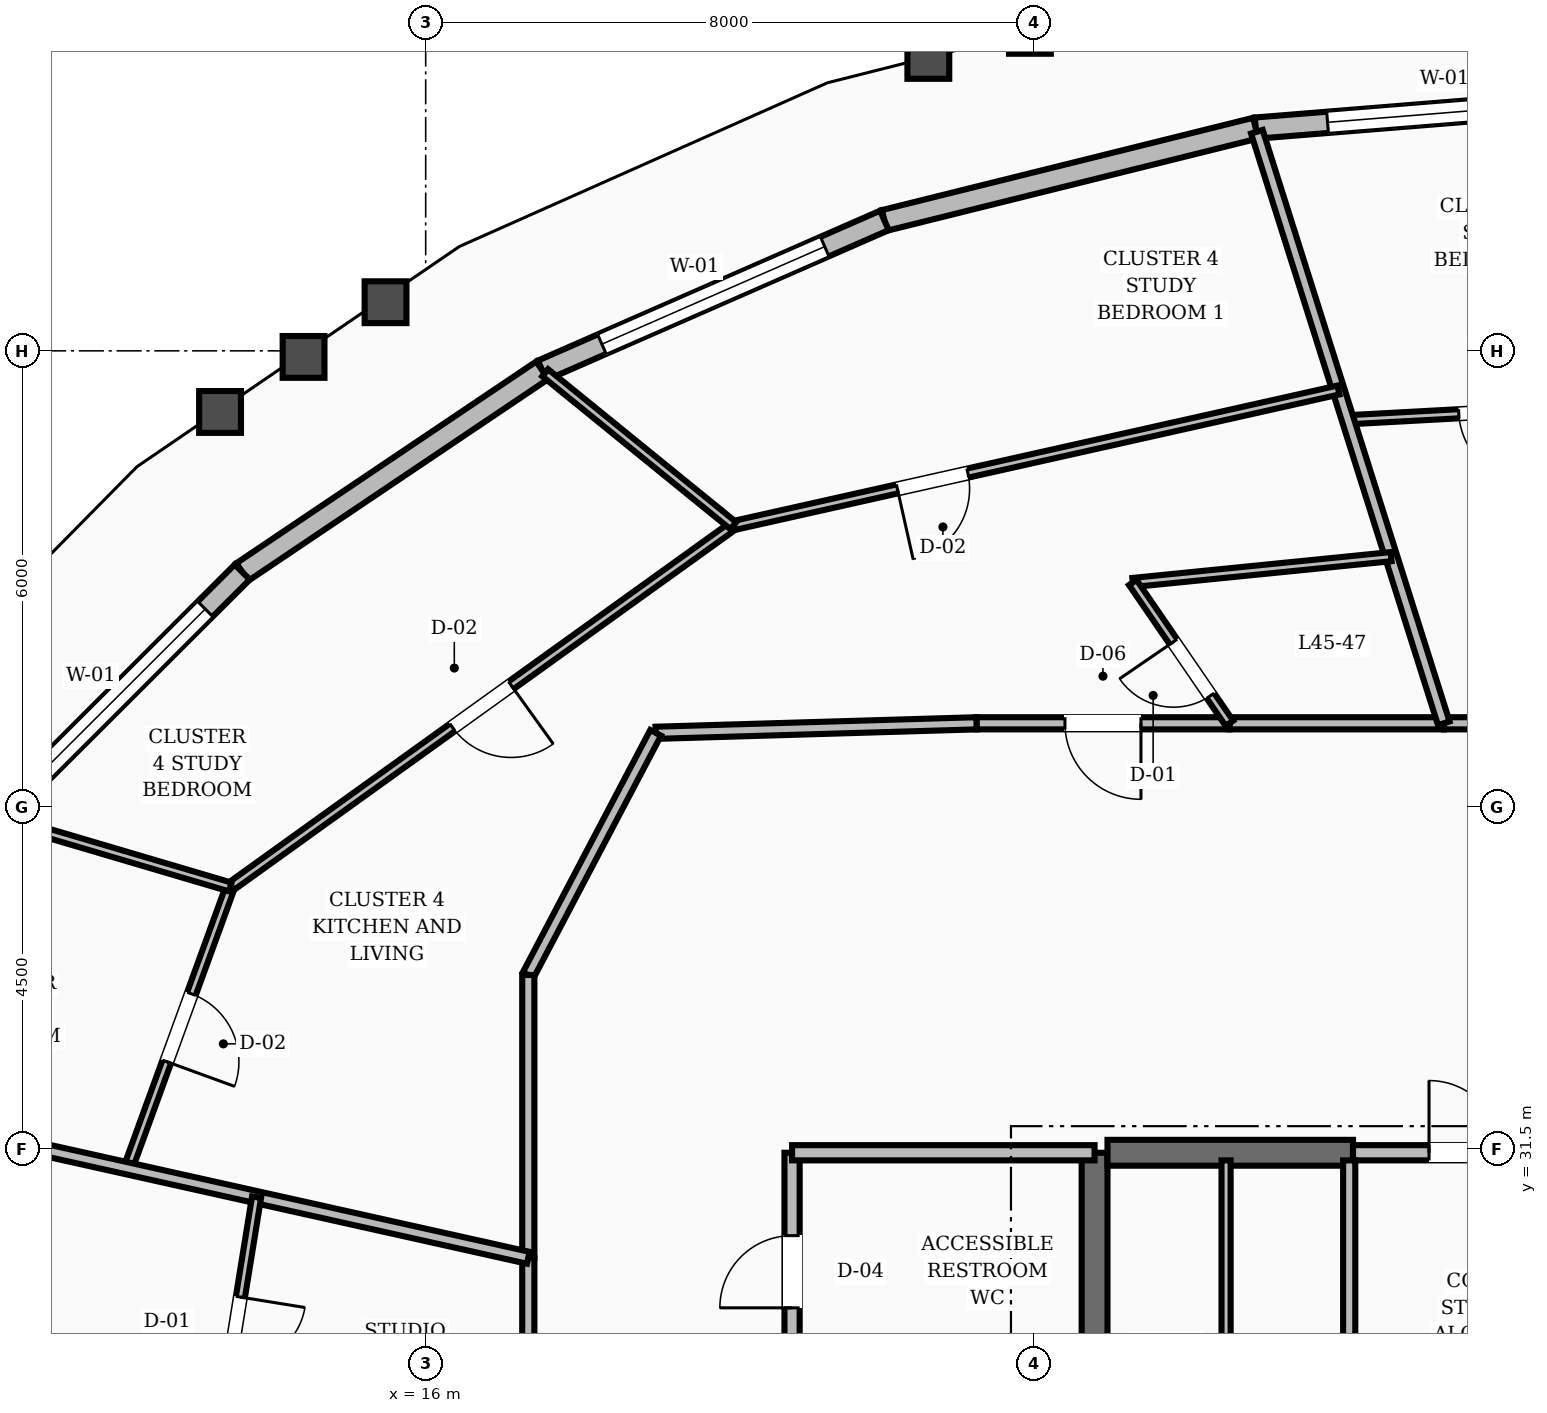
"""IFC4 building model, lengths in metres.
Left out: names, types, materials, properties, quantities, classifications, styles, units other than length and angle.
Written with IfcOpenShell. Run it as: python <this file> out.ifc"""

import sys

from ifc_helpers import new_model, si_unit, direction, frame, frame_2d, origin, place, context, subcontext, project, spatial, rectangle, extrude, element, fill, save


model = new_model("IFC4")
c1 = context("Model", 3, precision=1e-05, world=origin(), true_north=direction((0.0, 1.0)))
c2 = subcontext(c1, "Body", "Model", "MODEL_VIEW")
j1 = project(units=[si_unit("LENGTHUNIT", "METRE"), si_unit("PLANEANGLEUNIT", "RADIAN")], contexts=[c1])
p1 = place(None, origin())
s1 = spatial("IfcSite", under=j1, at=p1, CompositionType="ELEMENT")
p2 = place(p1, origin())
s2 = spatial("IfcBuilding", under=s1, at=p2, CompositionType="ELEMENT")
p3 = place(p2, frame((0.0, 0.0, 174.8)))
s3 = spatial("IfcBuildingStorey", under=s2, at=p3, CompositionType="ELEMENT", Elevation=174.8)
p4 = place(p3, frame((24.8, 25.15, 0.0), z_axis=(0.0, 0.0, 1.0), x_axis=(0.0, 1.0, 0.0)))
e1 = element("IfcWall", 1, at=p4, inside=s3, PredefinedType="SHEAR", context=c2, shape_type="SweptSolid", body=[
    extrude(rectangle(XDim=6.3, YDim=0.34, at=frame_2d((3.15, 0.0))), origin(), (0.0, 0.0, 1.0), 3.6),
])
p5 = place(p3, frame((24.97, 31.45, 0.0), z_axis=(0.0, 0.0, 1.0), x_axis=(1.0, 0.0, 0.0)))
e2 = element("IfcWall", 2, at=p5, inside=s3, PredefinedType="SHEAR", context=c2, shape_type="SweptSolid", body=[
    extrude(rectangle(XDim=3.23, YDim=0.34, at=frame_2d((1.615, 0.0))), origin(), (0.0, 0.0, 1.0), 3.6),
])
p6 = place(p3, frame((32.0, 45.34, 0.0), z_axis=(0.0, 0.0, 1.0), x_axis=(-0.996756522082, -0.080476305128, 0.0)))
e3 = element("IfcWall", 3, at=p6, inside=s3, PredefinedType="STANDARD", context=c2, shape_type="SweptSolid", body=[
    extrude(rectangle(XDim=5.097, YDim=0.28, at=frame_2d((2.548, 0.0))), origin(), (0.0, 0.0, 1.0), 2.82),
])
p7 = place(p6, frame((0.948, 0.0, 0.8)))
e4 = element("IfcOpeningElement", 4, at=p7, cuts=e3, PredefinedType="OPENING", context=c2, shape_type="SweptSolid", body=[
    extrude(rectangle(XDim=3.2, YDim=1.65, at=frame_2d((1.6, 0.825))), frame((0.0, 0.15, 0.0), z_axis=(0.0, -1.0, 0.0), x_axis=(1.0, 0.0, 0.0)), (0.0, 0.0, 1.0), 0.3),
])
p8 = place(p3, frame((26.92, 44.93, 0.0), z_axis=(0.0, 0.0, 1.0), x_axis=(-0.970464034564, -0.241245844766, 0.0)))
e5 = element("IfcWall", 5, at=p8, inside=s3, PredefinedType="STANDARD", context=c2, shape_type="SweptSolid", body=[
    extrude(rectangle(XDim=5.034, YDim=0.28, at=frame_2d((2.517, 0.0))), origin(), (0.0, 0.0, 1.0), 2.82),
])
p9 = place(p3, frame((22.035, 43.716, 0.0), z_axis=(0.0, 0.0, 1.0), x_axis=(-0.915983961181, -0.401214883647, 0.0)))
e6 = element("IfcWall", 6, at=p9, inside=s3, PredefinedType="STANDARD", context=c2, shape_type="SweptSolid", body=[
    extrude(rectangle(XDim=4.915, YDim=0.28, at=frame_2d((2.458, 0.0))), origin(), (0.0, 0.0, 1.0), 2.82),
])
p10 = place(p9, frame((0.857, 0.0, 0.8)))
e7 = element("IfcOpeningElement", 7, at=p10, cuts=e6, PredefinedType="OPENING", context=c2, shape_type="SweptSolid", body=[
    extrude(rectangle(XDim=3.2, YDim=1.65, at=frame_2d((1.6, 0.825))), frame((0.0, 0.15, 0.0), z_axis=(0.0, -1.0, 0.0), x_axis=(1.0, 0.0, 0.0)), (0.0, 0.0, 1.0), 0.3),
])
p11 = place(p3, frame((17.533, 41.744, 0.0), z_axis=(0.0, 0.0, 1.0), x_axis=(-0.829776575502, -0.558095721851, 0.0)))
e8 = element("IfcWall", 8, at=p11, inside=s3, PredefinedType="STANDARD", context=c2, shape_type="SweptSolid", body=[
    extrude(rectangle(XDim=4.756, YDim=0.28, at=frame_2d((2.378, 0.0))), origin(), (0.0, 0.0, 1.0), 2.82),
])
p12 = place(p3, frame((13.587, 39.09, 0.0), z_axis=(0.0, 0.0, 1.0), x_axis=(-0.707640043992, -0.706573115919, 0.0)))
e9 = element("IfcWall", 9, at=p12, inside=s3, PredefinedType="STANDARD", context=c2, shape_type="SweptSolid", body=[
    extrude(rectangle(XDim=4.576, YDim=0.28, at=frame_2d((2.288, 0.0))), origin(), (0.0, 0.0, 1.0), 2.82),
])
p13 = place(p12, frame((0.688, 0.0, 0.8)))
e10 = element("IfcOpeningElement", 10, at=p13, cuts=e9, PredefinedType="OPENING", context=c2, shape_type="SweptSolid", body=[
    extrude(rectangle(XDim=3.2, YDim=1.65, at=frame_2d((1.6, 0.825))), frame((0.0, 0.15, 0.0), z_axis=(0.0, -1.0, 0.0), x_axis=(1.0, 0.0, 0.0)), (0.0, 0.0, 1.0), 0.3),
])
p14 = place(p3, frame((20.82, 28.32, 0.0), z_axis=(0.0, 0.0, 1.0), x_axis=(0.0, 1.0, 0.0)))
e11 = element("IfcWall", 11, at=p14, inside=s3, PredefinedType="SOLIDWALL", context=c2, shape_type="SweptSolid", body=[
    extrude(rectangle(XDim=3.13, YDim=0.2, at=frame_2d((1.565, 0.0))), origin(), (0.0, 0.0, 1.0), 2.8),
])
p15 = place(p14, frame((1.09, 0.0, 0.0)))
e12 = element("IfcOpeningElement", 12, at=p15, cuts=e11, PredefinedType="OPENING", context=c2, shape_type="SweptSolid", body=[
    extrude(rectangle(XDim=0.95, YDim=2.1, at=frame_2d((0.475, 1.05))), frame((0.0, 0.11, 0.0), z_axis=(0.0, -1.0, 0.0), x_axis=(1.0, 0.0, 0.0)), (0.0, 0.0, 1.0), 0.22),
])
p16 = place(p3, frame((20.82, 31.45, 0.0), z_axis=(0.0, 0.0, 1.0), x_axis=(1.0, 0.0, 0.0)))
e13 = element("IfcWall", 13, at=p16, inside=s3, PredefinedType="SOLIDWALL", context=c2, shape_type="SweptSolid", body=[
    extrude(rectangle(XDim=3.98, YDim=0.2, at=frame_2d((1.99, 0.0))), origin(), (0.0, 0.0, 1.0), 2.8),
])
p17 = place(p3, frame((28.2, 31.45, 0.0), z_axis=(0.0, 0.0, 1.0), x_axis=(1.0, 0.0, 0.0)))
e14 = element("IfcWall", 14, at=p17, inside=s3, PredefinedType="SOLIDWALL", context=c2, shape_type="SweptSolid", body=[
    extrude(rectangle(XDim=7.6, YDim=0.2, at=frame_2d((3.8, 0.0))), origin(), (0.0, 0.0, 1.0), 2.8),
])
p18 = place(p17, frame((1.0, 0.0, 0.0)))
e15 = element("IfcOpeningElement", 15, at=p18, cuts=e14, PredefinedType="OPENING", context=c2, shape_type="SweptSolid", body=[
    extrude(rectangle(XDim=0.95, YDim=2.1, at=frame_2d((0.475, 1.05))), frame((0.0, 0.11, 0.0), z_axis=(0.0, -1.0, 0.0), x_axis=(1.0, 0.0, 0.0)), (0.0, 0.0, 1.0), 0.22),
])
p19 = place(p3, frame((28.15, 25.25, 0.0), z_axis=(0.0, 0.0, 1.0), x_axis=(0.0, 1.0, 0.0)))
e16 = element("IfcWall", 16, at=p19, inside=s3, PredefinedType="SOLIDWALL", context=c2, shape_type="SweptSolid", body=[
    extrude(rectangle(XDim=6.1, YDim=0.16, at=frame_2d((3.05, 0.0))), origin(), (0.0, 0.0, 1.0), 2.8),
])
p20 = place(p3, frame((26.53, 25.25, 0.0), z_axis=(0.0, 0.0, 1.0), x_axis=(0.0, 1.0, 0.0)))
e17 = element("IfcWall", 17, at=p20, inside=s3, PredefinedType="PARTITIONING", context=c2, shape_type="SweptSolid", body=[
    extrude(rectangle(XDim=6.1, YDim=0.12, at=frame_2d((3.05, 0.0))), origin(), (0.0, 0.0, 1.0), 2.8),
])
p21 = place(p3, frame((32.0, 37.1, 0.0), z_axis=(0.0, 0.0, 1.0), x_axis=(-1.0, 0.0, 0.0)))
e18 = element("IfcWall", 18, at=p21, inside=s3, PredefinedType="SOLIDWALL", context=c2, shape_type="SweptSolid", body=[
    extrude(rectangle(XDim=2.606, YDim=0.16, at=frame_2d((1.303, 0.0))), origin(), (0.0, 0.0, 1.0), 2.8),
])
p22 = place(p3, frame((29.394, 37.1, 0.0), z_axis=(0.0, 0.0, 1.0), x_axis=(-1.0, 0.0, 0.0)))
e19 = element("IfcWall", 19, at=p22, inside=s3, PredefinedType="SOLIDWALL", context=c2, shape_type="SweptSolid", body=[
    extrude(rectangle(XDim=2.821, YDim=0.16, at=frame_2d((1.41, 0.0))), origin(), (0.0, 0.0, 1.0), 2.8),
])
p23 = place(p3, frame((26.574, 37.1, 0.0), z_axis=(0.0, 0.0, 1.0), x_axis=(-1.0, 0.0, 0.0)))
e20 = element("IfcWall", 20, at=p23, inside=s3, PredefinedType="SOLIDWALL", context=c2, shape_type="SweptSolid", body=[
    extrude(rectangle(XDim=3.327, YDim=0.16, at=frame_2d((1.664, 0.0))), origin(), (0.0, 0.0, 1.0), 2.8),
])
p24 = place(p23, frame((1.164, 0.0, 0.0)))
e21 = element("IfcOpeningElement", 21, at=p24, cuts=e20, PredefinedType="OPENING", context=c2, shape_type="SweptSolid", body=[
    extrude(rectangle(XDim=1.0, YDim=2.1, at=frame_2d((0.5, 1.05))), frame((0.0, 0.09, 0.0), z_axis=(0.0, -1.0, 0.0), x_axis=(1.0, 0.0, 0.0)), (0.0, 0.0, 1.0), 0.18),
])
p25 = place(p3, frame((23.247, 37.1, 0.0), z_axis=(0.0, 0.0, 1.0), x_axis=(-0.999561990195, -0.029594387265, 0.0)))
e22 = element("IfcWall", 22, at=p25, inside=s3, PredefinedType="SOLIDWALL", context=c2, shape_type="SweptSolid", body=[
    extrude(rectangle(XDim=4.224, YDim=0.16, at=frame_2d((2.112, 0.0))), origin(), (0.0, 0.0, 1.0), 2.8),
])
p26 = place(p3, frame((19.025, 36.975, 0.0), z_axis=(0.0, 0.0, 1.0), x_axis=(-0.46527115782, -0.885168204185, 0.0)))
e23 = element("IfcWall", 23, at=p26, inside=s3, PredefinedType="SOLIDWALL", context=c2, shape_type="SweptSolid", body=[
    extrude(rectangle(XDim=3.6, YDim=0.16, at=frame_2d((1.8, 0.0))), origin(), (0.0, 0.0, 1.0), 2.8),
])
p27 = place(p3, frame((17.35, 33.789, 0.0), z_axis=(0.0, 0.0, 1.0), x_axis=(0.0, -1.0, 0.0)))
e24 = element("IfcWall", 24, at=p27, inside=s3, PredefinedType="SOLIDWALL", context=c2, shape_type="SweptSolid", body=[
    extrude(rectangle(XDim=3.721, YDim=0.16, at=frame_2d((1.86, 0.0))), origin(), (0.0, 0.0, 1.0), 2.8),
])
p28 = place(p3, frame((17.35, 30.068, 0.0), z_axis=(0.0, 0.0, 1.0), x_axis=(0.0, -1.0, 0.0)))
e25 = element("IfcWall", 25, at=p28, inside=s3, PredefinedType="SOLIDWALL", context=c2, shape_type="SweptSolid", body=[
    extrude(rectangle(XDim=3.154, YDim=0.16, at=frame_2d((1.577, 0.0))), origin(), (0.0, 0.0, 1.0), 2.8),
])
p29 = place(p3, frame((32.0, 41.302, 0.0), z_axis=(0.0, 0.0, 1.0), x_axis=(-0.998539976993, -0.054017722528, 0.0)))
e26 = element("IfcWall", 26, at=p29, inside=s3, PredefinedType="PARTITIONING", context=c2, shape_type="SweptSolid", body=[
    extrude(rectangle(XDim=3.873, YDim=0.12, at=frame_2d((1.937, 0.0))), origin(), (0.0, 0.0, 1.0), 2.8),
])
p30 = place(p29, frame((1.462, 0.0, 0.0)))
e27 = element("IfcOpeningElement", 27, at=p30, cuts=e26, PredefinedType="OPENING", context=c2, shape_type="SweptSolid", body=[
    extrude(rectangle(XDim=0.95, YDim=2.1, at=frame_2d((0.475, 1.05))), frame((0.0, 0.07, 0.0), z_axis=(0.0, -1.0, 0.0), x_axis=(1.0, 0.0, 0.0)), (0.0, 0.0, 1.0), 0.14),
])
p31 = place(p3, frame((29.394, 37.1, 0.0), z_axis=(0.0, 0.0, 1.0), x_axis=(-0.301346102792, 0.953514827537, 0.0)))
e28 = element("IfcWall", 28, at=p31, inside=s3, PredefinedType="SOLIDWALL", context=c2, shape_type="SweptSolid", body=[
    extrude(rectangle(XDim=8.162, YDim=0.16, at=frame_2d((4.081, 0.0))), origin(), (0.0, 0.0, 1.0), 2.8),
])
p32 = place(p3, frame((28.701, 39.292, 0.0), z_axis=(0.0, 0.0, 1.0), x_axis=(-0.995030110262, -0.099574493074, 0.0)))
e29 = element("IfcWall", 29, at=p32, inside=s3, PredefinedType="PARTITIONING", context=c2, shape_type="SweptSolid", body=[
    extrude(rectangle(XDim=3.416, YDim=0.12, at=frame_2d((1.708, 0.0))), origin(), (0.0, 0.0, 1.0), 2.8),
])
p33 = place(p3, frame((26.574, 37.1, 0.0), z_axis=(0.0, 0.0, 1.0), x_axis=(-0.565712100387, 0.82460282529, 0.0)))
e30 = element("IfcWall", 30, at=p33, inside=s3, PredefinedType="PARTITIONING", context=c2, shape_type="SweptSolid", body=[
    extrude(rectangle(XDim=2.246, YDim=0.12, at=frame_2d((1.123, 0.0))), origin(), (0.0, 0.0, 1.0), 2.8),
])
p34 = place(p33, frame((0.44, 0.0, 0.0)))
e31 = element("IfcOpeningElement", 31, at=p34, cuts=e30, PredefinedType="OPENING", context=c2, shape_type="SweptSolid", body=[
    extrude(rectangle(XDim=0.86, YDim=2.1, at=frame_2d((0.43, 1.05))), frame((0.0, 0.07, 0.0), z_axis=(0.0, -1.0, 0.0), x_axis=(1.0, 0.0, 0.0)), (0.0, 0.0, 1.0), 0.14),
])
p35 = place(p3, frame((28.009, 41.485, 0.0), z_axis=(0.0, 0.0, 1.0), x_axis=(-0.975790457845, -0.218707527028, 0.0)))
e32 = element("IfcWall", 32, at=p35, inside=s3, PredefinedType="PARTITIONING", context=c2, shape_type="SweptSolid", body=[
    extrude(rectangle(XDim=8.159, YDim=0.12, at=frame_2d((4.08, 0.0))), origin(), (0.0, 0.0, 1.0), 2.8),
])
p36 = place(p35, frame((4.997, 0.0, 0.0)))
e33 = element("IfcOpeningElement", 33, at=p36, cuts=e32, PredefinedType="OPENING", context=c2, shape_type="SweptSolid", body=[
    extrude(rectangle(XDim=0.95, YDim=2.1, at=frame_2d((0.475, 1.05))), frame((0.0, 0.07, 0.0), z_axis=(0.0, -1.0, 0.0), x_axis=(1.0, 0.0, 0.0)), (0.0, 0.0, 1.0), 0.14),
])
p37 = place(p3, frame((20.047, 39.7, 0.0), z_axis=(0.0, 0.0, 1.0), x_axis=(-0.812159557972, -0.583435388364, 0.0)))
e34 = element("IfcWall", 34, at=p37, inside=s3, PredefinedType="PARTITIONING", context=c2, shape_type="SweptSolid", body=[
    extrude(rectangle(XDim=8.148, YDim=0.12, at=frame_2d((4.074, 0.0))), origin(), (0.0, 0.0, 1.0), 2.8),
])
p38 = place(p37, frame((3.599, 0.0, 0.0)))
e35 = element("IfcOpeningElement", 35, at=p38, cuts=e34, PredefinedType="OPENING", context=c2, shape_type="SweptSolid", body=[
    extrude(rectangle(XDim=0.95, YDim=2.1, at=frame_2d((0.475, 1.05))), frame((0.0, 0.07, 0.0), z_axis=(0.0, -1.0, 0.0), x_axis=(1.0, 0.0, 0.0)), (0.0, 0.0, 1.0), 0.14),
])
p39 = place(p3, frame((20.047, 39.7, 0.0), z_axis=(0.0, 0.0, 1.0), x_axis=(-0.776036734146, 0.630687709771, 0.0)))
e36 = element("IfcWall", 36, at=p39, inside=s3, PredefinedType="PARTITIONING", context=c2, shape_type="SweptSolid", body=[
    extrude(rectangle(XDim=3.19, YDim=0.12, at=frame_2d((1.595, 0.0))), origin(), (0.0, 0.0, 1.0), 2.8),
])
p40 = place(p3, frame((13.429, 34.946, 0.0), z_axis=(0.0, 0.0, 1.0), x_axis=(-0.341981820704, -0.939706568195, 0.0)))
e37 = element("IfcWall", 37, at=p40, inside=s3, PredefinedType="PARTITIONING", context=c2, shape_type="SweptSolid", body=[
    extrude(rectangle(XDim=3.941, YDim=0.12, at=frame_2d((1.97, 0.0))), origin(), (0.0, 0.0, 1.0), 2.8),
])
p41 = place(p40, frame((1.495, 0.0, 0.0)))
e38 = element("IfcOpeningElement", 38, at=p41, cuts=e37, PredefinedType="OPENING", context=c2, shape_type="SweptSolid", body=[
    extrude(rectangle(XDim=0.95, YDim=2.1, at=frame_2d((0.475, 1.05))), frame((0.0, 0.07, 0.0), z_axis=(0.0, -1.0, 0.0), x_axis=(1.0, 0.0, 0.0)), (0.0, 0.0, 1.0), 0.14),
])
p42 = place(p3, frame((13.429, 34.946, 0.0), z_axis=(0.0, 0.0, 1.0), x_axis=(-0.959062516334, 0.283194438087, 0.0)))
e39 = element("IfcWall", 39, at=p42, inside=s3, PredefinedType="PARTITIONING", context=c2, shape_type="SweptSolid", body=[
    extrude(rectangle(XDim=3.162, YDim=0.12, at=frame_2d((1.581, 0.0))), origin(), (0.0, 0.0, 1.0), 2.8),
])
p43 = place(p3, frame((17.35, 30.068, 0.0), z_axis=(0.0, 0.0, 1.0), x_axis=(-0.976019030179, 0.217685214765, 0.0)))
e40 = element("IfcWall", 40, at=p43, inside=s3, PredefinedType="SOLIDWALL", context=c2, shape_type="SweptSolid", body=[
    extrude(rectangle(XDim=9.589, YDim=0.16, at=frame_2d((4.794, 0.0))), origin(), (0.0, 0.0, 1.0), 2.8),
])
p44 = place(p3, frame((13.775, 30.865, 0.0), z_axis=(0.0, 0.0, 1.0), x_axis=(-0.159855739545, -0.987140386437, 0.0)))
e41 = element("IfcWall", 41, at=p44, inside=s3, PredefinedType="PARTITIONING", context=c2, shape_type="SweptSolid", body=[
    extrude(rectangle(XDim=3.522, YDim=0.12, at=frame_2d((1.761, 0.0))), origin(), (0.0, 0.0, 1.0), 2.8),
])
p45 = place(p44, frame((1.331, 0.0, 0.0)))
e42 = element("IfcOpeningElement", 42, at=p45, cuts=e41, PredefinedType="OPENING", context=c2, shape_type="SweptSolid", body=[
    extrude(rectangle(XDim=0.86, YDim=2.1, at=frame_2d((0.43, 1.05))), frame((0.0, 0.07, 0.0), z_axis=(0.0, -1.0, 0.0), x_axis=(1.0, 0.0, 0.0)), (0.0, 0.0, 1.0), 0.14),
])
p46 = place(p7, origin())
e43 = element("IfcWindow", 43, at=p46, inside=s3, PartitioningType="SINGLE_PANEL", PredefinedType="WINDOW", context=c2, shape_type="SweptSolid", body=[
    extrude(rectangle(XDim=3.2, YDim=1.65, at=frame_2d((1.6, 0.825))), frame((0.0, 0.03, 0.0), z_axis=(0.0, -1.0, 0.0), x_axis=(1.0, 0.0, 0.0)), (0.0, 0.0, 1.0), 0.06),
])
fill(e4, e43)
p47 = place(p10, origin())
e44 = element("IfcWindow", 44, at=p47, inside=s3, PartitioningType="SINGLE_PANEL", PredefinedType="WINDOW", context=c2, shape_type="SweptSolid", body=[
    extrude(rectangle(XDim=3.2, YDim=1.65, at=frame_2d((1.6, 0.825))), frame((0.0, 0.03, 0.0), z_axis=(0.0, -1.0, 0.0), x_axis=(1.0, 0.0, 0.0)), (0.0, 0.0, 1.0), 0.06),
])
fill(e7, e44)
p48 = place(p13, origin())
e45 = element("IfcWindow", 45, at=p48, inside=s3, PartitioningType="SINGLE_PANEL", PredefinedType="WINDOW", context=c2, shape_type="SweptSolid", body=[
    extrude(rectangle(XDim=3.2, YDim=1.65, at=frame_2d((1.6, 0.825))), frame((0.0, 0.03, 0.0), z_axis=(0.0, -1.0, 0.0), x_axis=(1.0, 0.0, 0.0)), (0.0, 0.0, 1.0), 0.06),
])
fill(e10, e45)
p49 = place(p15, origin())
e46 = element("IfcDoor", 46, at=p49, inside=s3, OperationType="SINGLE_SWING_LEFT", PredefinedType="DOOR", context=c2, shape_type="SweptSolid", body=[
    extrude(rectangle(XDim=0.95, YDim=2.1, at=frame_2d((0.475, 1.05))), frame((0.0, 0.025, 0.0), z_axis=(0.0, -1.0, 0.0), x_axis=(1.0, 0.0, 0.0)), (0.0, 0.0, 1.0), 0.05),
])
fill(e12, e46)
p50 = place(p18, origin())
e47 = element("IfcDoor", 47, at=p50, inside=s3, OperationType="SINGLE_SWING_LEFT", PredefinedType="DOOR", context=c2, shape_type="SweptSolid", body=[
    extrude(rectangle(XDim=0.95, YDim=2.1, at=frame_2d((0.475, 1.05))), frame((0.0, 0.025, 0.0), z_axis=(0.0, -1.0, 0.0), x_axis=(1.0, 0.0, 0.0)), (0.0, 0.0, 1.0), 0.05),
])
fill(e15, e47)
p51 = place(p30, origin())
e48 = element("IfcDoor", 48, at=p51, inside=s3, OperationType="SINGLE_SWING_LEFT", PredefinedType="DOOR", context=c2, shape_type="SweptSolid", body=[
    extrude(rectangle(XDim=0.95, YDim=2.1, at=frame_2d((0.475, 1.05))), frame((0.0, 0.025, 0.0), z_axis=(0.0, -1.0, 0.0), x_axis=(1.0, 0.0, 0.0)), (0.0, 0.0, 1.0), 0.05),
])
fill(e27, e48)
p52 = place(p34, origin())
e49 = element("IfcDoor", 49, at=p52, inside=s3, OperationType="SINGLE_SWING_RIGHT", PredefinedType="DOOR", context=c2, shape_type="SweptSolid", body=[
    extrude(rectangle(XDim=0.86, YDim=2.1, at=frame_2d((0.43, 1.05))), frame((0.0, 0.025, 0.0), z_axis=(0.0, -1.0, 0.0), x_axis=(1.0, 0.0, 0.0)), (0.0, 0.0, 1.0), 0.05),
])
fill(e31, e49)
p53 = place(p24, origin())
e50 = element("IfcDoor", 50, at=p53, inside=s3, OperationType="SINGLE_SWING_LEFT", PredefinedType="DOOR", context=c2, shape_type="SweptSolid", body=[
    extrude(rectangle(XDim=1.0, YDim=2.1, at=frame_2d((0.5, 1.05))), frame((0.0, 0.025, 0.0), z_axis=(0.0, -1.0, 0.0), x_axis=(1.0, 0.0, 0.0)), (0.0, 0.0, 1.0), 0.05),
])
fill(e21, e50)
p54 = place(p36, origin())
e51 = element("IfcDoor", 51, at=p54, inside=s3, OperationType="SINGLE_SWING_RIGHT", PredefinedType="DOOR", context=c2, shape_type="SweptSolid", body=[
    extrude(rectangle(XDim=0.95, YDim=2.1, at=frame_2d((0.475, 1.05))), frame((0.0, 0.025, 0.0), z_axis=(0.0, -1.0, 0.0), x_axis=(1.0, 0.0, 0.0)), (0.0, 0.0, 1.0), 0.05),
])
fill(e33, e51)
p55 = place(p38, origin())
e52 = element("IfcDoor", 52, at=p55, inside=s3, OperationType="SINGLE_SWING_LEFT", PredefinedType="DOOR", context=c2, shape_type="SweptSolid", body=[
    extrude(rectangle(XDim=0.95, YDim=2.1, at=frame_2d((0.475, 1.05))), frame((0.0, 0.025, 0.0), z_axis=(0.0, -1.0, 0.0), x_axis=(1.0, 0.0, 0.0)), (0.0, 0.0, 1.0), 0.05),
])
fill(e35, e52)
p56 = place(p41, origin())
e53 = element("IfcDoor", 53, at=p56, inside=s3, OperationType="SINGLE_SWING_RIGHT", PredefinedType="DOOR", context=c2, shape_type="SweptSolid", body=[
    extrude(rectangle(XDim=0.95, YDim=2.1, at=frame_2d((0.475, 1.05))), frame((0.0, 0.025, 0.0), z_axis=(0.0, -1.0, 0.0), x_axis=(1.0, 0.0, 0.0)), (0.0, 0.0, 1.0), 0.05),
])
fill(e38, e53)
p57 = place(p45, origin())
e54 = element("IfcDoor", 54, at=p57, inside=s3, OperationType="SINGLE_SWING_LEFT", PredefinedType="DOOR", context=c2, shape_type="SweptSolid", body=[
    extrude(rectangle(XDim=0.86, YDim=2.1, at=frame_2d((0.43, 1.05))), frame((0.0, 0.025, 0.0), z_axis=(0.0, -1.0, 0.0), x_axis=(1.0, 0.0, 0.0)), (0.0, 0.0, 1.0), 0.05),
])
fill(e42, e54)
save(model, sys.argv[1])
